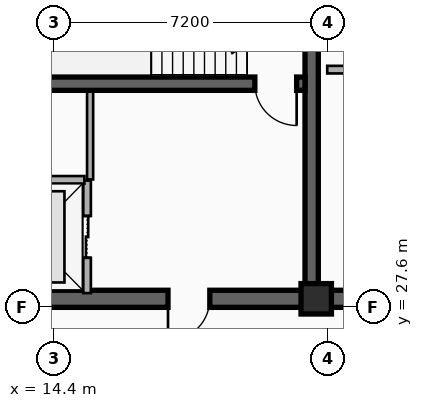
"""IFC4 building model, lengths in metres.
Left out: names, types, materials, properties, quantities, classifications, styles, units other than length and angle.
Written with IfcOpenShell. Run it as: python <this file> out.ifc"""

import sys

from ifc_helpers import new_model, si_unit, direction, frame, frame_2d, origin, origin_2d, place, context, subcontext, project, spatial, rectangle, extrude, element, fill, save


model = new_model("IFC4")
c1 = context("Model", 3, precision=1e-05, world=origin(), true_north=direction((0.0, 1.0)))
c2 = subcontext(c1, "Body", "Model", "MODEL_VIEW")
j1 = project(units=[si_unit("LENGTHUNIT", "METRE"), si_unit("PLANEANGLEUNIT", "RADIAN")], contexts=[c1])
p1 = place(None, origin())
s1 = spatial("IfcSite", under=j1, at=p1, CompositionType="ELEMENT")
p2 = place(p1, origin())
s2 = spatial("IfcBuilding", under=s1, at=p2, CompositionType="ELEMENT")
p3 = place(p2, frame((0.0, 0.0, 251.0)))
s3 = spatial("IfcBuildingStorey", under=s2, at=p3, CompositionType="ELEMENT", Elevation=251.0)
p4 = place(p3, frame((21.18, 27.82, 0.0), z_axis=(0.0, 0.0, 1.0), x_axis=(-1.0, 0.0, 0.0)))
e1 = element("IfcWall", 1, at=p4, inside=s3, PredefinedType="SHEAR", context=c2, shape_type="SweptSolid", body=[
    extrude(rectangle(XDim=9.03, YDim=0.45, at=frame_2d((4.515, 0.0))), origin(), (0.0, 0.0, 1.0), 3.7),
])
p5 = place(p4, frame((2.68, 0.0, 0.0)))
e2 = element("IfcOpeningElement", 2, at=p5, cuts=e1, PredefinedType="OPENING", context=c2, shape_type="SweptSolid", body=[
    extrude(rectangle(XDim=1.1, YDim=2.15, at=frame_2d((0.55, 1.075))), frame((0.0, 0.235, 0.0), z_axis=(0.0, -1.0, 0.0), x_axis=(1.0, 0.0, 0.0)), (0.0, 0.0, 1.0), 0.47),
])
p6 = place(p3, frame((33.15, 27.82, 0.0), z_axis=(0.0, 0.0, 1.0), x_axis=(-1.0, 0.0, 0.0)))
e3 = element("IfcWall", 3, at=p6, inside=s3, PredefinedType="SHEAR", context=c2, shape_type="SweptSolid", body=[
    extrude(rectangle(XDim=11.97, YDim=0.45, at=frame_2d((5.985, 0.0))), origin(), (0.0, 0.0, 1.0), 3.7),
])
p7 = place(p6, frame((6.1, 0.0, 0.0)))
e4 = element("IfcOpeningElement", 4, at=p7, cuts=e3, PredefinedType="OPENING", context=c2, shape_type="SweptSolid", body=[
    extrude(rectangle(XDim=1.6, YDim=2.2, at=frame_2d((0.8, 1.1))), frame((0.0, 0.235, 0.0), z_axis=(0.0, -1.0, 0.0), x_axis=(1.0, 0.0, 0.0)), (0.0, 0.0, 1.0), 0.47),
])
p8 = place(p3, frame((21.18, 28.045, 0.0), z_axis=(0.0, 0.0, 1.0), x_axis=(0.0, 1.0, 0.0)))
e5 = element("IfcWall", 5, at=p8, inside=s3, PredefinedType="SHEAR", context=c2, shape_type="SweptSolid", body=[
    extrude(rectangle(XDim=8.78, YDim=0.35, at=frame_2d((4.39, 0.0))), origin(), (0.0, 0.0, 1.0), 3.7),
])
p9 = place(p3, frame((21.005, 33.48, 0.0), z_axis=(0.0, 0.0, 1.0), x_axis=(-1.0, 0.0, 0.0)))
e6 = element("IfcWall", 6, at=p9, inside=s3, PredefinedType="SHEAR", context=c2, shape_type="SweptSolid", body=[
    extrude(rectangle(XDim=8.63, YDim=0.35, at=frame_2d((4.315, 0.0))), origin(), (0.0, 0.0, 1.0), 3.7),
])
p10 = place(p9, frame((0.22, 0.0, 0.0)))
e7 = element("IfcOpeningElement", 7, at=p10, cuts=e6, PredefinedType="OPENING", context=c2, shape_type="SweptSolid", body=[
    extrude(rectangle(XDim=1.1, YDim=2.15, at=frame_2d((0.55, 1.075))), frame((0.0, 0.185, 0.0), z_axis=(0.0, -1.0, 0.0), x_axis=(1.0, 0.0, 0.0)), (0.0, 0.0, 1.0), 0.37),
])
p11 = place(p3, frame((21.3, 27.82, 0.0), z_axis=(0.0, 0.0, 1.0), x_axis=(1.0, 0.0, 0.0)))
e8 = element("IfcColumn", 8, at=p11, inside=s3, PredefinedType="COLUMN", context=c2, shape_type="SweptSolid", body=[
    extrude(rectangle(XDim=0.8, YDim=0.8, at=origin_2d()), origin(), (0.0, 0.0, 1.0), 3.7),
])
p12 = place(p3, frame((15.27, 27.97, 0.0), z_axis=(0.0, 0.0, 1.0), x_axis=(0.0, 1.0, 0.0)))
e9 = element("IfcWall", 9, at=p12, inside=s3, PredefinedType="PARTITIONING", context=c2, shape_type="SweptSolid", body=[
    extrude(rectangle(XDim=2.96, YDim=0.2, at=frame_2d((1.48, 0.0))), origin(), (0.0, 0.0, 1.0), 2.49),
])
p13 = place(p12, frame((0.93, 0.0, 0.0)))
e10 = element("IfcOpeningElement", 10, at=p13, cuts=e9, PredefinedType="OPENING", context=c2, shape_type="SweptSolid", body=[
    extrude(rectangle(XDim=1.1, YDim=2.15, at=frame_2d((0.55, 1.075))), frame((0.0, 0.11, 0.0), z_axis=(0.0, -1.0, 0.0), x_axis=(1.0, 0.0, 0.0)), (0.0, 0.0, 1.0), 0.22),
])
p14 = place(p3, frame((12.45, 30.95, 0.0), z_axis=(0.0, 0.0, 1.0), x_axis=(1.0, 0.0, 0.0)))
e11 = element("IfcWall", 11, at=p14, inside=s3, PredefinedType="PARTITIONING", context=c2, shape_type="SweptSolid", body=[
    extrude(rectangle(XDim=2.75, YDim=0.2, at=frame_2d((1.375, 0.0))), origin(), (0.0, 0.0, 1.0), 2.49),
])
p15 = place(p3, frame((21.59, 33.85, 0.0), z_axis=(0.0, 0.0, 1.0), x_axis=(1.0, 0.0, 0.0)))
e12 = element("IfcWall", 12, at=p15, inside=s3, PredefinedType="PARTITIONING", context=c2, shape_type="SweptSolid", body=[
    extrude(rectangle(XDim=1.97, YDim=0.2, at=frame_2d((0.985, 0.0))), origin(), (0.0, 0.0, 1.0), 2.49),
])
p16 = place(p3, frame((15.35, 30.96, 0.0), z_axis=(0.0, 0.0, 1.0), x_axis=(0.0, 1.0, 0.0)))
e13 = element("IfcWall", 13, at=p16, inside=s3, PredefinedType="PARTITIONING", context=c2, shape_type="SweptSolid", body=[
    extrude(rectangle(XDim=2.31, YDim=0.16, at=frame_2d((1.155, 0.0))), origin(), (0.0, 0.0, 1.0), 3.42),
])
p17 = place(p13, origin())
e14 = element("IfcDoor", 14, at=p17, inside=s3, OperationType="DOUBLE_DOOR_SLIDING", PredefinedType="DOOR", context=c2, shape_type="SweptSolid", body=[
    extrude(rectangle(XDim=1.1, YDim=2.15, at=frame_2d((0.55, 1.075))), frame((0.0, 0.025, 0.0), z_axis=(0.0, -1.0, 0.0), x_axis=(1.0, 0.0, 0.0)), (0.0, 0.0, 1.0), 0.05),
])
fill(e10, e14)
p18 = place(p10, origin())
e15 = element("IfcDoor", 15, at=p18, inside=s3, OperationType="SINGLE_SWING_LEFT", PredefinedType="DOOR", context=c2, shape_type="SweptSolid", body=[
    extrude(rectangle(XDim=1.1, YDim=2.15, at=frame_2d((0.55, 1.075))), frame((0.0, 0.025, 0.0), z_axis=(0.0, -1.0, 0.0), x_axis=(1.0, 0.0, 0.0)), (0.0, 0.0, 1.0), 0.05),
])
fill(e7, e15)
p19 = place(p5, origin())
e16 = element("IfcDoor", 16, at=p19, inside=s3, OperationType="SINGLE_SWING_RIGHT", PredefinedType="DOOR", context=c2, shape_type="SweptSolid", body=[
    extrude(rectangle(XDim=1.1, YDim=2.15, at=frame_2d((0.55, 1.075))), frame((0.0, 0.025, 0.0), z_axis=(0.0, -1.0, 0.0), x_axis=(1.0, 0.0, 0.0)), (0.0, 0.0, 1.0), 0.05),
])
fill(e2, e16)
save(model, sys.argv[1])
